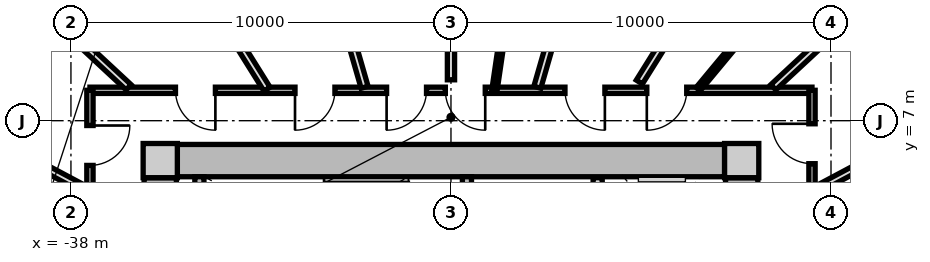
"""IFC4 building model, lengths in metres.
Left out: names, types, materials, properties, quantities, classifications, styles, units other than length and angle.
Written with IfcOpenShell. Run it as: python <this file> out.ifc"""

import sys

from ifc_helpers import new_model, si_unit, direction, frame, frame_2d, origin, origin_2d, place, context, subcontext, project, spatial, rectangle, extrude, source, transform, mapped, element, fill, save


model = new_model("IFC4")
c1 = context("Model", 3, precision=1e-05, world=origin(), true_north=direction((0.0, 1.0)))
c2 = subcontext(c1, "Body", "Model", "MODEL_VIEW")
j1 = project(units=[si_unit("LENGTHUNIT", "METRE"), si_unit("PLANEANGLEUNIT", "RADIAN")], contexts=[c1])
p1 = place(None, origin())
s1 = spatial("IfcSite", under=j1, at=p1, CompositionType="ELEMENT")
p2 = place(p1, origin())
s2 = spatial("IfcBuilding", under=s1, at=p2, CompositionType="ELEMENT")
p3 = place(p2, frame((0.0, 0.0, 52.1)))
s3 = spatial("IfcBuildingStorey", under=s2, at=p3, CompositionType="ELEMENT", Elevation=52.1)
m1 = source(origin(), c2, "Body", "SweptSolid", [
    extrude(rectangle(XDim=0.9, YDim=0.9, at=origin_2d()), origin(), (0.0, 0.0, 1.0), 3.05),
])
for number, where, z_axis, x_axis in (
    (1, (-20.35, 5.95, 0.0), (0.0, 0.0, 1.0), (1.0, 0.0, 0.0)),
    (2, (-35.65, 5.95, 0.0), (0.0, 0.0, 1.0), (1.0, 0.0, 0.0)),
):
    element("IfcColumn", number, at=place(p3, frame(where, z_axis=z_axis, x_axis=x_axis)), inside=s3, PredefinedType="COLUMN", context=c2, shape_type="MappedRepresentation", body=[
        mapped(m1, transform((0.0, 0.0, 0.0), x_axis=(1.0, 0.0, 0.0), y_axis=(0.0, 1.0, 0.0), z_axis=(0.0, 0.0, 1.0), scale=1.0)),
    ])
m2 = source(origin(), c2, "Body", "SweptSolid", [
    extrude(rectangle(XDim=14.4, YDim=0.85, at=frame_2d((7.2, 0.0))), origin(), (0.0, 0.0, 1.0), 2.79),
])
p4 = place(p3, frame((-35.2, 5.95, 0.0), z_axis=(0.0, 0.0, 1.0), x_axis=(1.0, 0.0, 0.0)))
e3 = element("IfcWall", 3, at=p4, inside=s3, PredefinedType="SHEAR", context=c2, shape_type="MappedRepresentation", body=[
    mapped(m2, transform((0.0, 0.0, 0.0), x_axis=(1.0, 0.0, 0.0), y_axis=(0.0, 1.0, 0.0), z_axis=(0.0, 0.0, 1.0), scale=1.0)),
])
m3 = source(origin(), c2, "Body", "SweptSolid", [
    extrude(rectangle(XDim=11.0, YDim=0.85, at=frame_2d((5.5, 0.0))), origin(), (0.0, 0.0, 1.0), 2.79),
])
p5 = place(p3, frame((-35.65, -5.5, 0.0), z_axis=(0.0, 0.0, 1.0), x_axis=(0.0, 1.0, 0.0)))
e4 = element("IfcWall", 4, at=p5, inside=s3, PredefinedType="SHEAR", context=c2, shape_type="MappedRepresentation", body=[
    mapped(m3, transform((0.0, 0.0, 0.0), x_axis=(1.0, 0.0, 0.0), y_axis=(0.0, 1.0, 0.0), z_axis=(0.0, 0.0, 1.0), scale=1.0)),
])
p6 = place(p5, frame((3.8, 0.0, 0.0)))
e5 = element("IfcOpeningElement", 5, at=p6, cuts=e4, PredefinedType="OPENING", context=c2, shape_type="SweptSolid", body=[
    extrude(rectangle(XDim=1.2, YDim=2.15, at=frame_2d((0.6, 1.075))), frame((0.0, 0.435, 0.0), z_axis=(0.0, -1.0, 0.0), x_axis=(1.0, 0.0, 0.0)), (0.0, 0.0, 1.0), 0.87),
])
p7 = place(p3, frame((-20.35, 5.5, 0.0), z_axis=(0.0, 0.0, 1.0), x_axis=(0.0, -1.0, 0.0)))
e6 = element("IfcWall", 6, at=p7, inside=s3, PredefinedType="SHEAR", context=c2, shape_type="MappedRepresentation", body=[
    mapped(m3, transform((0.0, 0.0, 0.0), x_axis=(1.0, 0.0, 0.0), y_axis=(0.0, 1.0, 0.0), z_axis=(0.0, 0.0, 1.0), scale=1.0)),
])
p8 = place(p7, frame((5.65, 0.0, 0.0)))
e7 = element("IfcOpeningElement", 7, at=p8, cuts=e6, PredefinedType="OPENING", context=c2, shape_type="SweptSolid", body=[
    extrude(rectangle(XDim=1.2, YDim=2.15, at=frame_2d((0.6, 1.075))), frame((0.0, 0.435, 0.0), z_axis=(0.0, -1.0, 0.0), x_axis=(1.0, 0.0, 0.0)), (0.0, 0.0, 1.0), 0.87),
])
m4 = source(origin(), c2, "Body", "SweptSolid", [
    extrude(rectangle(XDim=3.075, YDim=0.24, at=frame_2d((1.538, 0.0))), origin(), (0.0, 0.0, 1.0), 2.79),
])
p9 = place(p3, frame((-34.62, 2.45, 0.0), z_axis=(0.0, 0.0, 1.0), x_axis=(0.0, 1.0, 0.0)))
e8 = element("IfcWall", 8, at=p9, inside=s3, PredefinedType="PARTITIONING", context=c2, shape_type="MappedRepresentation", body=[
    mapped(m4, transform((0.0, 0.0, 0.0), x_axis=(1.0, 0.0, 0.0), y_axis=(0.0, 1.0, 0.0), z_axis=(0.0, 0.0, 1.0), scale=1.0)),
])
p10 = place(p3, frame((-27.58, 2.45, 0.0), z_axis=(0.0, 0.0, 1.0), x_axis=(0.0, 1.0, 0.0)))
e9 = element("IfcWall", 9, at=p10, inside=s3, PredefinedType="PARTITIONING", context=c2, shape_type="MappedRepresentation", body=[
    mapped(m4, transform((0.0, 0.0, 0.0), x_axis=(1.0, 0.0, 0.0), y_axis=(0.0, 1.0, 0.0), z_axis=(0.0, 0.0, 1.0), scale=1.0)),
])
p11 = place(p10, frame((0.55, 0.0, 0.0)))
e10 = element("IfcOpeningElement", 10, at=p11, cuts=e9, PredefinedType="OPENING", context=c2, shape_type="SweptSolid", body=[
    extrude(rectangle(XDim=1.1, YDim=2.15, at=frame_2d((0.55, 1.075))), frame((0.0, 0.13, 0.0), z_axis=(0.0, -1.0, 0.0), x_axis=(1.0, 0.0, 0.0)), (0.0, 0.0, 1.0), 0.26),
])
m5 = source(origin(), c2, "Body", "SweptSolid", [
    extrude(rectangle(XDim=5.0, YDim=0.24, at=frame_2d((2.5, 0.0))), origin(), (0.0, 0.0, 1.0), 2.775),
])
p12 = place(p3, frame((-24.14, 0.5, 0.0), z_axis=(0.0, 0.0, 1.0), x_axis=(0.0, 1.0, 0.0)))
e11 = element("IfcWall", 11, at=p12, inside=s3, PredefinedType="PARTITIONING", context=c2, shape_type="MappedRepresentation", body=[
    mapped(m5, transform((0.0, 0.0, 0.0), x_axis=(1.0, 0.0, 0.0), y_axis=(0.0, 1.0, 0.0), z_axis=(0.0, 0.0, 1.0), scale=1.0)),
])
p13 = place(p12, frame((3.05, 0.0, 0.0)))
e12 = element("IfcOpeningElement", 12, at=p13, cuts=e11, PredefinedType="OPENING", context=c2, shape_type="SweptSolid", body=[
    extrude(rectangle(XDim=1.3, YDim=2.2, at=frame_2d((0.65, 1.1))), frame((0.0, 0.13, 0.0), z_axis=(0.0, -1.0, 0.0), x_axis=(1.0, 0.0, 0.0)), (0.0, 0.0, 1.0), 0.26),
])
p14 = place(p12, frame((0.55, 0.0, 0.0)))
e13 = element("IfcOpeningElement", 13, at=p14, cuts=e11, PredefinedType="OPENING", context=c2, shape_type="SweptSolid", body=[
    extrude(rectangle(XDim=1.3, YDim=2.2, at=frame_2d((0.65, 1.1))), frame((0.0, 0.13, 0.0), z_axis=(0.0, -1.0, 0.0), x_axis=(1.0, 0.0, 0.0)), (0.0, 0.0, 1.0), 0.26),
])
m6 = source(origin(), c2, "Body", "SweptSolid", [
    extrude(rectangle(XDim=19.0, YDim=0.165, at=frame_2d((9.5, 0.0))), origin(), (0.0, 0.0, 1.0), 2.775),
])
p15 = place(p3, frame((-37.5, 7.8, 0.0), z_axis=(0.0, 0.0, 1.0), x_axis=(1.0, 0.0, 0.0)))
e14 = element("IfcWall", 14, at=p15, inside=s3, PredefinedType="PARTITIONING", context=c2, shape_type="MappedRepresentation", body=[
    mapped(m6, transform((0.0, 0.0, 0.0), x_axis=(1.0, 0.0, 0.0), y_axis=(0.0, 1.0, 0.0), z_axis=(0.0, 0.0, 1.0), scale=1.0)),
])
p16 = place(p15, frame((14.653, 0.0, 0.0)))
e15 = element("IfcOpeningElement", 15, at=p16, cuts=e14, PredefinedType="OPENING", context=c2, shape_type="SweptSolid", body=[
    extrude(rectangle(XDim=1.05, YDim=2.15, at=frame_2d((0.525, 1.075))), frame((0.0, 0.093, 0.0), z_axis=(0.0, -1.0, 0.0), x_axis=(1.0, 0.0, 0.0)), (0.0, 0.0, 1.0), 0.185),
])
p17 = place(p15, frame((12.5, 0.0, 0.0)))
e16 = element("IfcOpeningElement", 16, at=p17, cuts=e14, PredefinedType="OPENING", context=c2, shape_type="SweptSolid", body=[
    extrude(rectangle(XDim=1.05, YDim=2.15, at=frame_2d((0.525, 1.075))), frame((0.0, 0.093, 0.0), z_axis=(0.0, -1.0, 0.0), x_axis=(1.0, 0.0, 0.0)), (0.0, 0.0, 1.0), 0.185),
])
p18 = place(p15, frame((9.352, 0.0, 0.0)))
e17 = element("IfcOpeningElement", 17, at=p18, cuts=e14, PredefinedType="OPENING", context=c2, shape_type="SweptSolid", body=[
    extrude(rectangle(XDim=1.05, YDim=2.15, at=frame_2d((0.525, 1.075))), frame((0.0, 0.093, 0.0), z_axis=(0.0, -1.0, 0.0), x_axis=(1.0, 0.0, 0.0)), (0.0, 0.0, 1.0), 0.185),
])
p19 = place(p15, frame((7.806, 0.0, 0.0)))
e18 = element("IfcOpeningElement", 18, at=p19, cuts=e14, PredefinedType="OPENING", context=c2, shape_type="SweptSolid", body=[
    extrude(rectangle(XDim=1.05, YDim=2.15, at=frame_2d((0.525, 1.075))), frame((0.0, 0.093, 0.0), z_axis=(0.0, -1.0, 0.0), x_axis=(1.0, 0.0, 0.0)), (0.0, 0.0, 1.0), 0.185),
])
p20 = place(p15, frame((5.396, 0.0, 0.0)))
e19 = element("IfcOpeningElement", 19, at=p20, cuts=e14, PredefinedType="OPENING", context=c2, shape_type="SweptSolid", body=[
    extrude(rectangle(XDim=1.05, YDim=2.15, at=frame_2d((0.525, 1.075))), frame((0.0, 0.093, 0.0), z_axis=(0.0, -1.0, 0.0), x_axis=(1.0, 0.0, 0.0)), (0.0, 0.0, 1.0), 0.185),
])
p21 = place(p15, frame((2.251, 0.0, 0.0)))
e20 = element("IfcOpeningElement", 20, at=p21, cuts=e14, PredefinedType="OPENING", context=c2, shape_type="SweptSolid", body=[
    extrude(rectangle(XDim=1.05, YDim=2.15, at=frame_2d((0.525, 1.075))), frame((0.0, 0.093, 0.0), z_axis=(0.0, -1.0, 0.0), x_axis=(1.0, 0.0, 0.0)), (0.0, 0.0, 1.0), 0.185),
])
m7 = source(origin(), c2, "Body", "SweptSolid", [
    extrude(rectangle(XDim=15.6, YDim=0.165, at=frame_2d((7.8, 0.0))), origin(), (0.0, 0.0, 1.0), 2.775),
])
p22 = place(p3, frame((-37.5, -7.8, 0.0), z_axis=(0.0, 0.0, 1.0), x_axis=(0.0, 1.0, 0.0)))
e21 = element("IfcWall", 21, at=p22, inside=s3, PredefinedType="PARTITIONING", context=c2, shape_type="MappedRepresentation", body=[
    mapped(m7, transform((0.0, 0.0, 0.0), x_axis=(1.0, 0.0, 0.0), y_axis=(0.0, 1.0, 0.0), z_axis=(0.0, 0.0, 1.0), scale=1.0)),
])
p23 = place(p22, frame((13.623, 0.0, 0.0)))
e22 = element("IfcOpeningElement", 22, at=p23, cuts=e21, PredefinedType="OPENING", context=c2, shape_type="SweptSolid", body=[
    extrude(rectangle(XDim=1.05, YDim=2.15, at=frame_2d((0.525, 1.075))), frame((0.0, 0.093, 0.0), z_axis=(0.0, -1.0, 0.0), x_axis=(1.0, 0.0, 0.0)), (0.0, 0.0, 1.0), 0.185),
])
p24 = place(p22, frame((11.018, 0.0, 0.0)))
e23 = element("IfcOpeningElement", 23, at=p24, cuts=e21, PredefinedType="OPENING", context=c2, shape_type="SweptSolid", body=[
    extrude(rectangle(XDim=1.05, YDim=2.15, at=frame_2d((0.525, 1.075))), frame((0.0, 0.093, 0.0), z_axis=(0.0, -1.0, 0.0), x_axis=(1.0, 0.0, 0.0)), (0.0, 0.0, 1.0), 0.185),
])
p25 = place(p22, frame((8.467, 0.0, 0.0)))
e24 = element("IfcOpeningElement", 24, at=p25, cuts=e21, PredefinedType="OPENING", context=c2, shape_type="SweptSolid", body=[
    extrude(rectangle(XDim=1.05, YDim=2.15, at=frame_2d((0.525, 1.075))), frame((0.0, 0.093, 0.0), z_axis=(0.0, -1.0, 0.0), x_axis=(1.0, 0.0, 0.0)), (0.0, 0.0, 1.0), 0.185),
])
p26 = place(p22, frame((6.035, 0.0, 0.0)))
e25 = element("IfcOpeningElement", 25, at=p26, cuts=e21, PredefinedType="OPENING", context=c2, shape_type="SweptSolid", body=[
    extrude(rectangle(XDim=1.05, YDim=2.15, at=frame_2d((0.525, 1.075))), frame((0.0, 0.093, 0.0), z_axis=(0.0, -1.0, 0.0), x_axis=(1.0, 0.0, 0.0)), (0.0, 0.0, 1.0), 0.185),
])
p27 = place(p22, frame((3.489, 0.0, 0.0)))
e26 = element("IfcOpeningElement", 26, at=p27, cuts=e21, PredefinedType="OPENING", context=c2, shape_type="SweptSolid", body=[
    extrude(rectangle(XDim=1.05, YDim=2.15, at=frame_2d((0.525, 1.075))), frame((0.0, 0.093, 0.0), z_axis=(0.0, -1.0, 0.0), x_axis=(1.0, 0.0, 0.0)), (0.0, 0.0, 1.0), 0.185),
])
p28 = place(p22, frame((0.882, 0.0, 0.0)))
e27 = element("IfcOpeningElement", 27, at=p28, cuts=e21, PredefinedType="OPENING", context=c2, shape_type="SweptSolid", body=[
    extrude(rectangle(XDim=1.05, YDim=2.15, at=frame_2d((0.525, 1.075))), frame((0.0, 0.093, 0.0), z_axis=(0.0, -1.0, 0.0), x_axis=(1.0, 0.0, 0.0)), (0.0, 0.0, 1.0), 0.185),
])
p29 = place(p3, frame((-18.5, 7.8, 0.0), z_axis=(0.0, 0.0, 1.0), x_axis=(0.0, -1.0, 0.0)))
e28 = element("IfcWall", 28, at=p29, inside=s3, PredefinedType="PARTITIONING", context=c2, shape_type="MappedRepresentation", body=[
    mapped(m7, transform((0.0, 0.0, 0.0), x_axis=(1.0, 0.0, 0.0), y_axis=(0.0, 1.0, 0.0), z_axis=(0.0, 0.0, 1.0), scale=1.0)),
])
p30 = place(p29, frame((12.141, 0.0, 0.0)))
e29 = element("IfcOpeningElement", 29, at=p30, cuts=e28, PredefinedType="OPENING", context=c2, shape_type="SweptSolid", body=[
    extrude(rectangle(XDim=1.25, YDim=2.2, at=frame_2d((0.625, 1.1))), frame((0.0, 0.093, 0.0), z_axis=(0.0, -1.0, 0.0), x_axis=(1.0, 0.0, 0.0)), (0.0, 0.0, 1.0), 0.185),
])
p31 = place(p29, frame((7.175, 0.0, 0.0)))
e30 = element("IfcOpeningElement", 30, at=p31, cuts=e28, PredefinedType="OPENING", context=c2, shape_type="SweptSolid", body=[
    extrude(rectangle(XDim=1.25, YDim=2.2, at=frame_2d((0.625, 1.1))), frame((0.0, 0.093, 0.0), z_axis=(0.0, -1.0, 0.0), x_axis=(1.0, 0.0, 0.0)), (0.0, 0.0, 1.0), 0.185),
])
p32 = place(p29, frame((2.826, 0.0, 0.0)))
e31 = element("IfcOpeningElement", 31, at=p32, cuts=e28, PredefinedType="OPENING", context=c2, shape_type="SweptSolid", body=[
    extrude(rectangle(XDim=1.05, YDim=2.15, at=frame_2d((0.525, 1.075))), frame((0.0, 0.093, 0.0), z_axis=(0.0, -1.0, 0.0), x_axis=(1.0, 0.0, 0.0)), (0.0, 0.0, 1.0), 0.185),
])
p33 = place(p29, frame((0.881, 0.0, 0.0)))
e32 = element("IfcOpeningElement", 32, at=p33, cuts=e28, PredefinedType="OPENING", context=c2, shape_type="SweptSolid", body=[
    extrude(rectangle(XDim=1.05, YDim=2.15, at=frame_2d((0.525, 1.075))), frame((0.0, 0.093, 0.0), z_axis=(0.0, -1.0, 0.0), x_axis=(1.0, 0.0, 0.0)), (0.0, 0.0, 1.0), 0.185),
])
m8 = source(origin(), c2, "Body", "SweptSolid", [
    extrude(rectangle(XDim=7.435, YDim=0.19, at=frame_2d((3.717, 0.0))), origin(), (0.0, 0.0, 1.0), 2.225),
])
p34 = place(p3, frame((-36.483, 7.88, 0.0), z_axis=(0.0, 0.0, 1.0), x_axis=(-0.732651956848, 0.680603489652, 0.0)))
e33 = element("IfcWall", 33, at=p34, inside=s3, PredefinedType="PARTITIONING", context=c2, shape_type="MappedRepresentation", body=[
    mapped(m8, transform((0.0, 0.0, 0.0), x_axis=(1.0, 0.0, 0.0), y_axis=(0.0, 1.0, 0.0), z_axis=(0.0, 0.0, 1.0), scale=1.0)),
])
m9 = source(origin(), c2, "Body", "SweptSolid", [
    extrude(rectangle(XDim=7.873, YDim=0.19, at=frame_2d((3.937, 0.0))), origin(), (0.0, 0.0, 1.0), 2.775),
])
p35 = place(p3, frame((-37.53, 5.138, 0.0), z_axis=(0.0, 0.0, 1.0), x_axis=(-0.882666052726, 0.470000680175, 0.0)))
e34 = element("IfcWall", 34, at=p35, inside=s3, PredefinedType="PARTITIONING", context=c2, shape_type="MappedRepresentation", body=[
    mapped(m9, transform((0.0, 0.0, 0.0), x_axis=(1.0, 0.0, 0.0), y_axis=(0.0, 1.0, 0.0), z_axis=(0.0, 0.0, 1.0), scale=1.0)),
])
p36 = place(p3, frame((-19.517, 7.88, 0.0), z_axis=(0.0, 0.0, 1.0), x_axis=(0.732651956848, 0.680603489652, 0.0)))
e35 = element("IfcWall", 35, at=p36, inside=s3, PredefinedType="PARTITIONING", context=c2, shape_type="MappedRepresentation", body=[
    mapped(m8, transform((0.0, 0.0, 0.0), x_axis=(1.0, 0.0, 0.0), y_axis=(0.0, 1.0, 0.0), z_axis=(0.0, 0.0, 1.0), scale=1.0)),
])
m10 = source(origin(), c2, "Body", "SweptSolid", [
    extrude(rectangle(XDim=7.677, YDim=0.19, at=frame_2d((3.838, 0.0))), origin(), (0.0, 0.0, 1.0), 2.775),
])
p37 = place(p3, frame((-18.297, 5.231, 0.0), z_axis=(0.0, 0.0, 1.0), x_axis=(0.882725057546, 0.469889851753, 0.0)))
e36 = element("IfcWall", 36, at=p37, inside=s3, PredefinedType="PARTITIONING", context=c2, shape_type="MappedRepresentation", body=[
    mapped(m10, transform((0.0, 0.0, 0.0), x_axis=(1.0, 0.0, 0.0), y_axis=(0.0, 1.0, 0.0), z_axis=(0.0, 0.0, 1.0), scale=1.0)),
])
m11 = source(origin(), c2, "Body", "SweptSolid", [
    extrude(rectangle(XDim=10.196, YDim=0.19, at=frame_2d((5.098, 0.0))), origin(), (0.0, 0.0, 1.0), 2.225),
])
p38 = place(p3, frame((-25.727, 7.88, 0.0), z_axis=(0.0, 0.0, 1.0), x_axis=(0.277136420347, 0.960830580549, 0.0)))
e37 = element("IfcWall", 37, at=p38, inside=s3, PredefinedType="PARTITIONING", context=c2, shape_type="MappedRepresentation", body=[
    mapped(m11, transform((0.0, 0.0, 0.0), x_axis=(1.0, 0.0, 0.0), y_axis=(0.0, 1.0, 0.0), z_axis=(0.0, 0.0, 1.0), scale=1.0)),
])
m12 = source(origin(), c2, "Body", "SweptSolid", [
    extrude(rectangle(XDim=8.598, YDim=0.19, at=frame_2d((4.299, 0.0))), origin(), (0.0, 0.0, 1.0), 2.775),
])
p39 = place(p3, frame((-23.043, 8.017, 0.0), z_axis=(0.0, 0.0, 1.0), x_axis=(0.530039776395, 0.847972779893, 0.0)))
e38 = element("IfcWall", 38, at=p39, inside=s3, PredefinedType="PARTITIONING", context=c2, shape_type="MappedRepresentation", body=[
    mapped(m12, transform((0.0, 0.0, 0.0), x_axis=(1.0, 0.0, 0.0), y_axis=(0.0, 1.0, 0.0), z_axis=(0.0, 0.0, 1.0), scale=1.0)),
])
m13 = source(origin(), c2, "Body", "SweptSolid", [
    extrude(rectangle(XDim=3.594, YDim=0.14, at=frame_2d((1.797, 0.0))), origin(), (0.0, 0.0, 1.0), 2.775),
])
p40 = place(p3, frame((-21.496, 7.83, 0.0), z_axis=(0.0, 0.0, 1.0), x_axis=(0.639001147083, 0.769205781326, 0.0)))
e39 = element("IfcWall", 39, at=p40, inside=s3, PredefinedType="PARTITIONING", context=c2, shape_type="MappedRepresentation", body=[
    mapped(m13, transform((0.0, 0.0, 0.0), x_axis=(1.0, 0.0, 0.0), y_axis=(0.0, 1.0, 0.0), z_axis=(0.0, 0.0, 1.0), scale=1.0)),
])
p41 = place(p40, frame((1.337, 0.0, 0.0)))
e40 = element("IfcOpeningElement", 40, at=p41, cuts=e39, PredefinedType="OPENING", context=c2, shape_type="SweptSolid", body=[
    extrude(rectangle(XDim=0.92, YDim=2.1, at=frame_2d((0.46, 1.05))), frame((0.0, 0.08, 0.0), z_axis=(0.0, -1.0, 0.0), x_axis=(1.0, 0.0, 0.0)), (0.0, 0.0, 1.0), 0.16),
])
p42 = place(p3, frame((-30.273, 7.88, 0.0), z_axis=(0.0, 0.0, 1.0), x_axis=(-0.277136420347, 0.960830580549, 0.0)))
e41 = element("IfcWall", 41, at=p42, inside=s3, PredefinedType="PARTITIONING", context=c2, shape_type="MappedRepresentation", body=[
    mapped(m11, transform((0.0, 0.0, 0.0), x_axis=(1.0, 0.0, 0.0), y_axis=(0.0, 1.0, 0.0), z_axis=(0.0, 0.0, 1.0), scale=1.0)),
])
m14 = source(origin(), c2, "Body", "SweptSolid", [
    extrude(rectangle(XDim=9.601, YDim=0.19, at=frame_2d((4.8, 0.0))), origin(), (0.0, 0.0, 1.0), 2.775),
])
p43 = place(p3, frame((-28.0, 8.076, 0.0), z_axis=(0.0, 0.0, 1.0), x_axis=(0.0, 1.0, 0.0)))
e42 = element("IfcWall", 42, at=p43, inside=s3, PredefinedType="PARTITIONING", context=c2, shape_type="MappedRepresentation", body=[
    mapped(m14, transform((0.0, 0.0, 0.0), x_axis=(1.0, 0.0, 0.0), y_axis=(0.0, 1.0, 0.0), z_axis=(0.0, 0.0, 1.0), scale=1.0)),
])
m15 = source(origin(), c2, "Body", "SweptSolid", [
    extrude(rectangle(XDim=5.37, YDim=0.14, at=frame_2d((2.685, 0.0))), origin(), (0.0, 0.0, 1.0), 2.775),
])
p44 = place(p3, frame((-26.851, 7.83, 0.0), z_axis=(0.0, 0.0, 1.0), x_axis=(0.145131397853, 0.989412389935, 0.0)))
e43 = element("IfcWall", 43, at=p44, inside=s3, PredefinedType="PARTITIONING", context=c2, shape_type="MappedRepresentation", body=[
    mapped(m15, transform((0.0, 0.0, 0.0), x_axis=(1.0, 0.0, 0.0), y_axis=(0.0, 1.0, 0.0), z_axis=(0.0, 0.0, 1.0), scale=1.0)),
])
p45 = place(p44, frame((2.225, 0.0, 0.0)))
e44 = element("IfcOpeningElement", 44, at=p45, cuts=e43, PredefinedType="OPENING", context=c2, shape_type="SweptSolid", body=[
    extrude(rectangle(XDim=0.92, YDim=2.1, at=frame_2d((0.46, 1.05))), frame((0.0, 0.08, 0.0), z_axis=(0.0, -1.0, 0.0), x_axis=(1.0, 0.0, 0.0)), (0.0, 0.0, 1.0), 0.16),
])
m16 = source(origin(), c2, "Body", "SweptSolid", [
    extrude(rectangle(XDim=8.818, YDim=0.19, at=frame_2d((4.409, 0.0))), origin(), (0.0, 0.0, 1.0), 2.775),
])
p46 = place(p3, frame((-32.841, 7.83, 0.0), z_axis=(0.0, 0.0, 1.0), x_axis=(-0.529931746109, 0.848040296487, 0.0)))
e45 = element("IfcWall", 45, at=p46, inside=s3, PredefinedType="PARTITIONING", context=c2, shape_type="MappedRepresentation", body=[
    mapped(m16, transform((0.0, 0.0, 0.0), x_axis=(1.0, 0.0, 0.0), y_axis=(0.0, 1.0, 0.0), z_axis=(0.0, 0.0, 1.0), scale=1.0)),
])
m17 = source(origin(), c2, "Body", "SweptSolid", [
    extrude(rectangle(XDim=1.05, YDim=2.15, at=frame_2d((0.525, 1.075))), frame((0.0, 0.025, 0.0), z_axis=(0.0, -1.0, 0.0), x_axis=(1.0, 0.0, 0.0)), (0.0, 0.0, 1.0), 0.05),
])
p47 = place(p23, frame((1.05, 0.0, 0.0), z_axis=(0.0, 0.0, 1.0), x_axis=(-1.0, 0.0, 0.0)))
e46 = element("IfcDoor", 46, at=p47, inside=s3, OperationType="SINGLE_SWING_LEFT", PredefinedType="DOOR", context=c2, shape_type="MappedRepresentation", body=[
    mapped(m17, transform((0.0, 0.0, 0.0), x_axis=(1.0, 0.0, 0.0), y_axis=(0.0, 1.0, 0.0), z_axis=(0.0, 0.0, 1.0), scale=1.0)),
])
fill(e22, e46)
p48 = place(p33, frame((1.05, 0.0, 0.0), z_axis=(0.0, 0.0, 1.0), x_axis=(-1.0, 0.0, 0.0)))
e47 = element("IfcDoor", 47, at=p48, inside=s3, OperationType="SINGLE_SWING_RIGHT", PredefinedType="DOOR", context=c2, shape_type="MappedRepresentation", body=[
    mapped(m17, transform((0.0, 0.0, 0.0), x_axis=(1.0, 0.0, 0.0), y_axis=(0.0, 1.0, 0.0), z_axis=(0.0, 0.0, 1.0), scale=1.0)),
])
fill(e32, e47)
p49 = place(p16, frame((1.05, 0.0, 0.0), z_axis=(0.0, 0.0, 1.0), x_axis=(-1.0, 0.0, 0.0)))
e48 = element("IfcDoor", 48, at=p49, inside=s3, OperationType="SINGLE_SWING_RIGHT", PredefinedType="DOOR", context=c2, shape_type="MappedRepresentation", body=[
    mapped(m17, transform((0.0, 0.0, 0.0), x_axis=(1.0, 0.0, 0.0), y_axis=(0.0, 1.0, 0.0), z_axis=(0.0, 0.0, 1.0), scale=1.0)),
])
fill(e15, e48)
p50 = place(p17, frame((1.05, 0.0, 0.0), z_axis=(0.0, 0.0, 1.0), x_axis=(-1.0, 0.0, 0.0)))
e49 = element("IfcDoor", 49, at=p50, inside=s3, OperationType="SINGLE_SWING_LEFT", PredefinedType="DOOR", context=c2, shape_type="MappedRepresentation", body=[
    mapped(m17, transform((0.0, 0.0, 0.0), x_axis=(1.0, 0.0, 0.0), y_axis=(0.0, 1.0, 0.0), z_axis=(0.0, 0.0, 1.0), scale=1.0)),
])
fill(e16, e49)
p51 = place(p18, frame((1.05, 0.0, 0.0), z_axis=(0.0, 0.0, 1.0), x_axis=(-1.0, 0.0, 0.0)))
e50 = element("IfcDoor", 50, at=p51, inside=s3, OperationType="SINGLE_SWING_LEFT", PredefinedType="DOOR", context=c2, shape_type="MappedRepresentation", body=[
    mapped(m17, transform((0.0, 0.0, 0.0), x_axis=(1.0, 0.0, 0.0), y_axis=(0.0, 1.0, 0.0), z_axis=(0.0, 0.0, 1.0), scale=1.0)),
])
fill(e17, e50)
p52 = place(p19, frame((1.05, 0.0, 0.0), z_axis=(0.0, 0.0, 1.0), x_axis=(-1.0, 0.0, 0.0)))
e51 = element("IfcDoor", 51, at=p52, inside=s3, OperationType="SINGLE_SWING_RIGHT", PredefinedType="DOOR", context=c2, shape_type="MappedRepresentation", body=[
    mapped(m17, transform((0.0, 0.0, 0.0), x_axis=(1.0, 0.0, 0.0), y_axis=(0.0, 1.0, 0.0), z_axis=(0.0, 0.0, 1.0), scale=1.0)),
])
fill(e18, e51)
p53 = place(p20, frame((1.05, 0.0, 0.0), z_axis=(0.0, 0.0, 1.0), x_axis=(-1.0, 0.0, 0.0)))
e52 = element("IfcDoor", 52, at=p53, inside=s3, OperationType="SINGLE_SWING_RIGHT", PredefinedType="DOOR", context=c2, shape_type="MappedRepresentation", body=[
    mapped(m17, transform((0.0, 0.0, 0.0), x_axis=(1.0, 0.0, 0.0), y_axis=(0.0, 1.0, 0.0), z_axis=(0.0, 0.0, 1.0), scale=1.0)),
])
fill(e19, e52)
p54 = place(p21, frame((1.05, 0.0, 0.0), z_axis=(0.0, 0.0, 1.0), x_axis=(-1.0, 0.0, 0.0)))
e53 = element("IfcDoor", 53, at=p54, inside=s3, OperationType="SINGLE_SWING_LEFT", PredefinedType="DOOR", context=c2, shape_type="MappedRepresentation", body=[
    mapped(m17, transform((0.0, 0.0, 0.0), x_axis=(1.0, 0.0, 0.0), y_axis=(0.0, 1.0, 0.0), z_axis=(0.0, 0.0, 1.0), scale=1.0)),
])
fill(e20, e53)
save(model, sys.argv[1])
